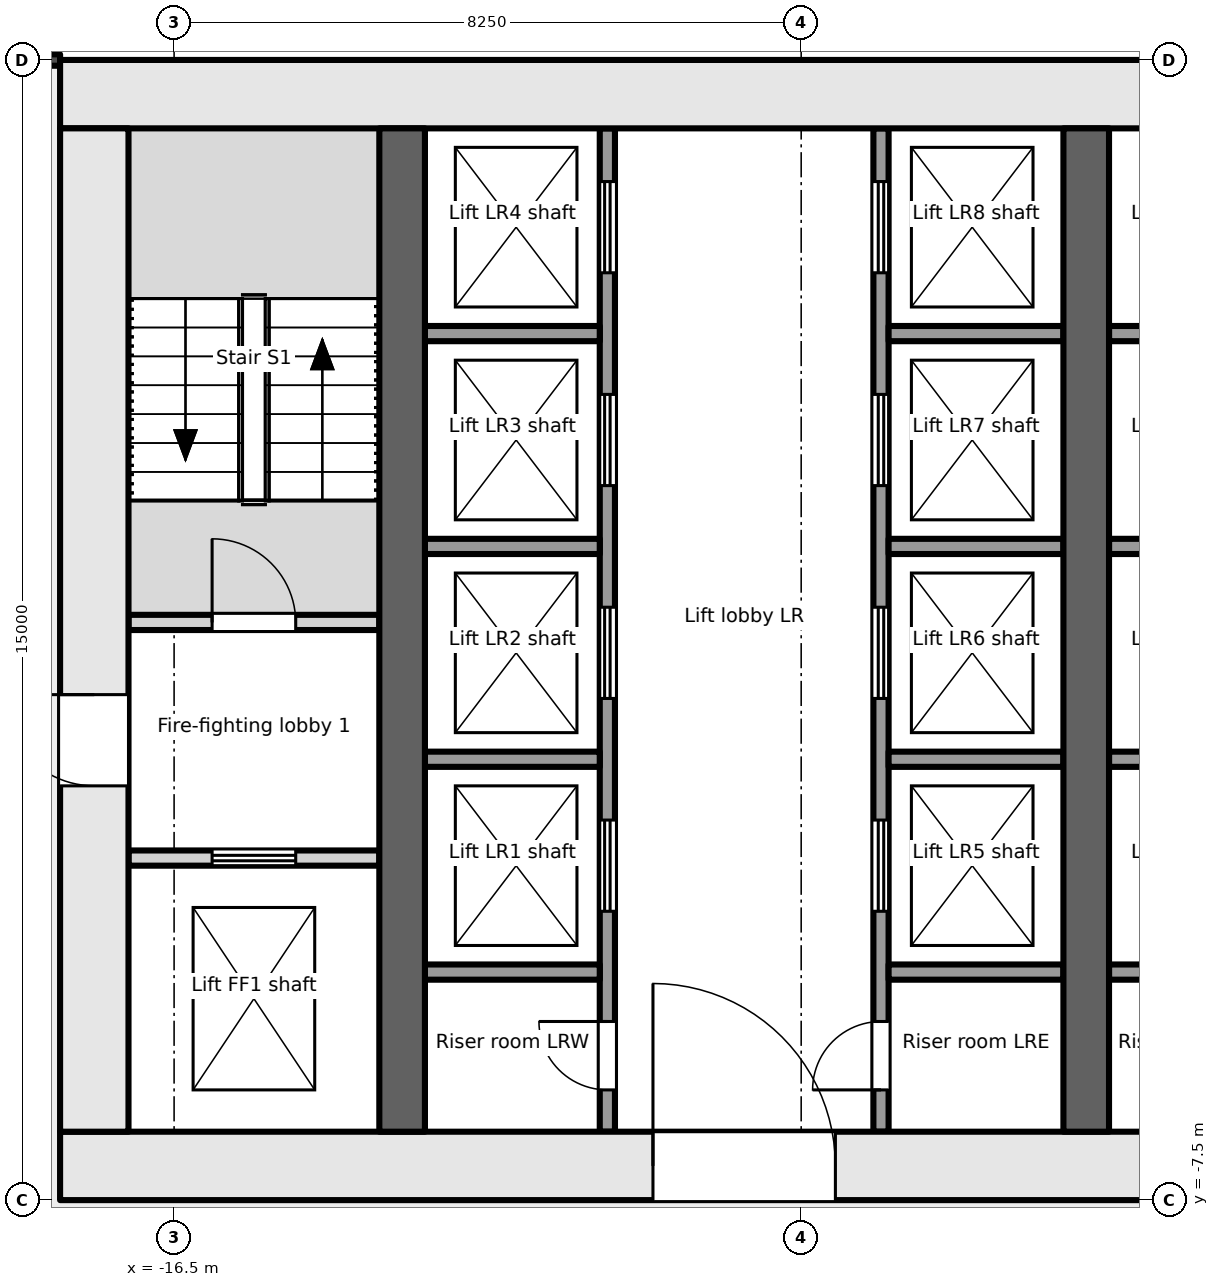
"""IFC4 building model, lengths in metres.
Left out: names, types, materials, properties, quantities, classifications, styles, units other than length and angle.
Written with IfcOpenShell. Run it as: python <this file> out.ifc"""

import sys

from ifc_helpers import new_model, si_unit, direction, frame, frame_2d, origin, place, context, subcontext, project, spatial, rectangle, extrude, element, fill, save


model = new_model("IFC4")
c1 = context("Model", 3, precision=1e-05, world=origin(), true_north=direction((0.0, 1.0)))
c2 = subcontext(c1, "Body", "Model", "MODEL_VIEW")
j1 = project(units=[si_unit("LENGTHUNIT", "METRE"), si_unit("PLANEANGLEUNIT", "RADIAN")], contexts=[c1])
p1 = place(None, origin())
s1 = spatial("IfcSite", under=j1, at=p1, CompositionType="ELEMENT")
p2 = place(p1, origin())
s2 = spatial("IfcBuilding", under=s1, at=p2, CompositionType="ELEMENT")
p3 = place(p2, frame((0.0, 0.0, 7.2)))
s3 = spatial("IfcBuildingStorey", under=s2, at=p3, CompositionType="ELEMENT", Elevation=7.2)
p4 = place(p3, frame((-18.0, -7.05, -0.2), z_axis=(0.0, 0.0, 1.0), x_axis=(1.0, 0.0, 0.0)))
e1 = element("IfcWall", 1, at=p4, inside=s3, PredefinedType="SHEAR", context=c2, shape_type="SweptSolid", body=[
    extrude(rectangle(XDim=36.0, YDim=0.9, at=frame_2d((18.0, 0.0))), origin(), (0.0, 0.0, 1.0), 5.4),
])
p5 = place(p4, frame((7.8, 0.0, 0.2)))
e2 = element("IfcOpeningElement", 2, at=p5, cuts=e1, PredefinedType="OPENING", context=c2, shape_type="SweptSolid", body=[
    extrude(rectangle(XDim=2.4, YDim=2.1, at=frame_2d((1.2, 1.05))), frame((0.0, 0.46, 0.0), z_axis=(0.0, -1.0, 0.0), x_axis=(1.0, 0.0, 0.0)), (0.0, 0.0, 1.0), 0.921),
])
p6 = place(p4, frame((17.4, 0.0, 0.2)))
e3 = element("IfcOpeningElement", 3, at=p6, cuts=e1, PredefinedType="OPENING", context=c2, shape_type="SweptSolid", body=[
    extrude(rectangle(XDim=1.2, YDim=2.1, at=frame_2d((0.6, 1.05))), frame((0.0, 0.46, 0.0), z_axis=(0.0, -1.0, 0.0), x_axis=(1.0, 0.0, 0.0)), (0.0, 0.0, 1.0), 0.921),
])
p7 = place(p4, frame((26.1, 0.0, 0.2)))
e4 = element("IfcOpeningElement", 4, at=p7, cuts=e1, PredefinedType="OPENING", context=c2, shape_type="SweptSolid", body=[
    extrude(rectangle(XDim=2.4, YDim=2.1, at=frame_2d((1.2, 1.05))), frame((0.0, 0.46, 0.0), z_axis=(0.0, -1.0, 0.0), x_axis=(1.0, 0.0, 0.0)), (0.0, 0.0, 1.0), 0.921),
])
p8 = place(p3, frame((-18.0, 7.05, -0.2), z_axis=(0.0, 0.0, 1.0), x_axis=(1.0, 0.0, 0.0)))
e5 = element("IfcWall", 5, at=p8, inside=s3, PredefinedType="SHEAR", context=c2, shape_type="SweptSolid", body=[
    extrude(rectangle(XDim=36.0, YDim=0.9, at=frame_2d((18.0, 0.0))), origin(), (0.0, 0.0, 1.0), 5.4),
])
p9 = place(p3, frame((-17.55, -6.6, -0.2), z_axis=(0.0, 0.0, 1.0), x_axis=(0.0, 1.0, 0.0)))
e6 = element("IfcWall", 6, at=p9, inside=s3, PredefinedType="SHEAR", context=c2, shape_type="SweptSolid", body=[
    extrude(rectangle(XDim=13.2, YDim=0.9, at=frame_2d((6.6, 0.0))), origin(), (0.0, 0.0, 1.0), 5.4),
])
p10 = place(p9, frame((4.55, 0.0, 0.2)))
e7 = element("IfcOpeningElement", 7, at=p10, cuts=e6, PredefinedType="OPENING", context=c2, shape_type="SweptSolid", body=[
    extrude(rectangle(XDim=1.2, YDim=2.1, at=frame_2d((0.6, 1.05))), frame((0.0, 0.46, 0.0), z_axis=(0.0, -1.0, 0.0), x_axis=(1.0, 0.0, 0.0)), (0.0, 0.0, 1.0), 0.921),
])
for number, where, z_axis, x_axis in (
    (8, (-13.5, -6.6, -0.2), (0.0, 0.0, 1.0), (0.0, 1.0, 0.0)),
    (9, (-4.5, -6.6, -0.2), (0.0, 0.0, 1.0), (0.0, 1.0, 0.0)),
):
    element("IfcWall", number, at=place(p3, frame(where, z_axis=z_axis, x_axis=x_axis)), inside=s3, PredefinedType="SHEAR", context=c2, shape_type="SweptSolid", body=[
        extrude(rectangle(XDim=13.2, YDim=0.6, at=frame_2d((6.6, 0.0))), origin(), (0.0, 0.0, 1.0), 5.4),
    ])
p11 = place(p3, frame((-17.1, -3.0, 0.0), z_axis=(0.0, 0.0, 1.0), x_axis=(1.0, 0.0, 0.0)))
e10 = element("IfcWall", 10, at=p11, inside=s3, PredefinedType="PARTITIONING", context=c2, shape_type="SweptSolid", body=[
    extrude(rectangle(XDim=3.3, YDim=0.2, at=frame_2d((1.65, 0.0))), origin(), (0.0, 0.0, 1.0), 5.2),
])
p12 = place(p11, frame((1.1, 0.0, 0.0)))
e11 = element("IfcOpeningElement", 11, at=p12, cuts=e10, PredefinedType="OPENING", context=c2, shape_type="SweptSolid", body=[
    extrude(rectangle(XDim=1.1, YDim=2.1, at=frame_2d((0.55, 1.05))), frame((0.0, 0.111, 0.0), z_axis=(0.0, -1.0, 0.0), x_axis=(1.0, 0.0, 0.0)), (0.0, 0.0, 1.0), 0.221),
])
p13 = place(p3, frame((-17.1, 0.1, 0.0), z_axis=(0.0, 0.0, 1.0), x_axis=(1.0, 0.0, 0.0)))
e12 = element("IfcWall", 12, at=p13, inside=s3, PredefinedType="PARTITIONING", context=c2, shape_type="SweptSolid", body=[
    extrude(rectangle(XDim=3.3, YDim=0.2, at=frame_2d((1.65, 0.0))), origin(), (0.0, 0.0, 1.0), 5.2),
])
p14 = place(p13, frame((1.1, 0.0, 0.0)))
e13 = element("IfcOpeningElement", 13, at=p14, cuts=e12, PredefinedType="OPENING", context=c2, shape_type="SweptSolid", body=[
    extrude(rectangle(XDim=1.1, YDim=2.1, at=frame_2d((0.55, 1.05))), frame((0.0, 0.111, 0.0), z_axis=(0.0, -1.0, 0.0), x_axis=(1.0, 0.0, 0.0)), (0.0, 0.0, 1.0), 0.221),
])
p15 = place(p3, frame((-10.8, -6.6, 0.0), z_axis=(0.0, 0.0, 1.0), x_axis=(0.0, 1.0, 0.0)))
e14 = element("IfcWall", 14, at=p15, inside=s3, PredefinedType="PARTITIONING", context=c2, shape_type="SweptSolid", body=[
    extrude(rectangle(XDim=13.2, YDim=0.2, at=frame_2d((6.6, 0.0))), origin(), (0.0, 0.0, 1.0), 5.2),
])
p16 = place(p15, frame((0.55, 0.0, 0.0)))
e15 = element("IfcOpeningElement", 15, at=p16, cuts=e14, PredefinedType="OPENING", context=c2, shape_type="SweptSolid", body=[
    extrude(rectangle(XDim=0.9, YDim=2.1, at=frame_2d((0.45, 1.05))), frame((0.0, 0.111, 0.0), z_axis=(0.0, -1.0, 0.0), x_axis=(1.0, 0.0, 0.0)), (0.0, 0.0, 1.0), 0.221),
])
p17 = place(p15, frame((2.9, 0.0, 0.0)))
e16 = element("IfcOpeningElement", 16, at=p17, cuts=e14, PredefinedType="OPENING", context=c2, shape_type="SweptSolid", body=[
    extrude(rectangle(XDim=1.2, YDim=2.1, at=frame_2d((0.6, 1.05))), frame((0.0, 0.111, 0.0), z_axis=(0.0, -1.0, 0.0), x_axis=(1.0, 0.0, 0.0)), (0.0, 0.0, 1.0), 0.221),
])
p18 = place(p15, frame((5.7, 0.0, 0.0)))
e17 = element("IfcOpeningElement", 17, at=p18, cuts=e14, PredefinedType="OPENING", context=c2, shape_type="SweptSolid", body=[
    extrude(rectangle(XDim=1.2, YDim=2.1, at=frame_2d((0.6, 1.05))), frame((0.0, 0.111, 0.0), z_axis=(0.0, -1.0, 0.0), x_axis=(1.0, 0.0, 0.0)), (0.0, 0.0, 1.0), 0.221),
])
p19 = place(p15, frame((8.5, 0.0, 0.0)))
e18 = element("IfcOpeningElement", 18, at=p19, cuts=e14, PredefinedType="OPENING", context=c2, shape_type="SweptSolid", body=[
    extrude(rectangle(XDim=1.2, YDim=2.1, at=frame_2d((0.6, 1.05))), frame((0.0, 0.111, 0.0), z_axis=(0.0, -1.0, 0.0), x_axis=(1.0, 0.0, 0.0)), (0.0, 0.0, 1.0), 0.221),
])
p20 = place(p15, frame((11.3, 0.0, 0.0)))
e19 = element("IfcOpeningElement", 19, at=p20, cuts=e14, PredefinedType="OPENING", context=c2, shape_type="SweptSolid", body=[
    extrude(rectangle(XDim=1.2, YDim=2.1, at=frame_2d((0.6, 1.05))), frame((0.0, 0.111, 0.0), z_axis=(0.0, -1.0, 0.0), x_axis=(1.0, 0.0, 0.0)), (0.0, 0.0, 1.0), 0.221),
])
p21 = place(p3, frame((-7.2, -6.6, 0.0), z_axis=(0.0, 0.0, 1.0), x_axis=(0.0, 1.0, 0.0)))
e20 = element("IfcWall", 20, at=p21, inside=s3, PredefinedType="PARTITIONING", context=c2, shape_type="SweptSolid", body=[
    extrude(rectangle(XDim=13.2, YDim=0.2, at=frame_2d((6.6, 0.0))), origin(), (0.0, 0.0, 1.0), 5.2),
])
p22 = place(p21, frame((0.55, 0.0, 0.0)))
e21 = element("IfcOpeningElement", 21, at=p22, cuts=e20, PredefinedType="OPENING", context=c2, shape_type="SweptSolid", body=[
    extrude(rectangle(XDim=0.9, YDim=2.1, at=frame_2d((0.45, 1.05))), frame((0.0, 0.111, 0.0), z_axis=(0.0, -1.0, 0.0), x_axis=(1.0, 0.0, 0.0)), (0.0, 0.0, 1.0), 0.221),
])
p23 = place(p21, frame((2.9, 0.0, 0.0)))
e22 = element("IfcOpeningElement", 22, at=p23, cuts=e20, PredefinedType="OPENING", context=c2, shape_type="SweptSolid", body=[
    extrude(rectangle(XDim=1.2, YDim=2.1, at=frame_2d((0.6, 1.05))), frame((0.0, 0.111, 0.0), z_axis=(0.0, -1.0, 0.0), x_axis=(1.0, 0.0, 0.0)), (0.0, 0.0, 1.0), 0.221),
])
p24 = place(p21, frame((5.7, 0.0, 0.0)))
e23 = element("IfcOpeningElement", 23, at=p24, cuts=e20, PredefinedType="OPENING", context=c2, shape_type="SweptSolid", body=[
    extrude(rectangle(XDim=1.2, YDim=2.1, at=frame_2d((0.6, 1.05))), frame((0.0, 0.111, 0.0), z_axis=(0.0, -1.0, 0.0), x_axis=(1.0, 0.0, 0.0)), (0.0, 0.0, 1.0), 0.221),
])
p25 = place(p21, frame((8.5, 0.0, 0.0)))
e24 = element("IfcOpeningElement", 24, at=p25, cuts=e20, PredefinedType="OPENING", context=c2, shape_type="SweptSolid", body=[
    extrude(rectangle(XDim=1.2, YDim=2.1, at=frame_2d((0.6, 1.05))), frame((0.0, 0.111, 0.0), z_axis=(0.0, -1.0, 0.0), x_axis=(1.0, 0.0, 0.0)), (0.0, 0.0, 1.0), 0.221),
])
p26 = place(p21, frame((11.3, 0.0, 0.0)))
e25 = element("IfcOpeningElement", 25, at=p26, cuts=e20, PredefinedType="OPENING", context=c2, shape_type="SweptSolid", body=[
    extrude(rectangle(XDim=1.2, YDim=2.1, at=frame_2d((0.6, 1.05))), frame((0.0, 0.111, 0.0), z_axis=(0.0, -1.0, 0.0), x_axis=(1.0, 0.0, 0.0)), (0.0, 0.0, 1.0), 0.221),
])
for number, where, z_axis, x_axis in (
    (26, (-13.2, -1.7, 0.0), (0.0, 0.0, 1.0), (1.0, 0.0, 0.0)),
    (27, (-13.2, 1.1, 0.0), (0.0, 0.0, 1.0), (1.0, 0.0, 0.0)),
    (28, (-13.2, 3.9, 0.0), (0.0, 0.0, 1.0), (1.0, 0.0, 0.0)),
    (29, (-13.2, -4.5, 0.0), (0.0, 0.0, 1.0), (1.0, 0.0, 0.0)),
    (30, (-7.1, -1.7, 0.0), (0.0, 0.0, 1.0), (1.0, 0.0, 0.0)),
    (31, (-7.1, 1.1, 0.0), (0.0, 0.0, 1.0), (1.0, 0.0, 0.0)),
    (32, (-7.1, 3.9, 0.0), (0.0, 0.0, 1.0), (1.0, 0.0, 0.0)),
    (33, (-7.1, -4.5, 0.0), (0.0, 0.0, 1.0), (1.0, 0.0, 0.0)),
    (34, (-4.2, -1.7, 0.0), (0.0, 0.0, 1.0), (1.0, 0.0, 0.0)),
    (35, (-4.2, 1.1, 0.0), (0.0, 0.0, 1.0), (1.0, 0.0, 0.0)),
    (36, (-4.2, 3.9, 0.0), (0.0, 0.0, 1.0), (1.0, 0.0, 0.0)),
    (37, (-4.2, -4.5, 0.0), (0.0, 0.0, 1.0), (1.0, 0.0, 0.0)),
):
    element("IfcWall", number, at=place(p3, frame(where, z_axis=z_axis, x_axis=x_axis)), inside=s3, PredefinedType="PARTITIONING", context=c2, shape_type="SweptSolid", body=[
        extrude(rectangle(XDim=2.3, YDim=0.2, at=frame_2d((1.15, 0.0))), origin(), (0.0, 0.0, 1.0), 5.2),
    ])
p27 = place(p3, frame((-20.91, 7.499, 0.0), z_axis=(0.0, 0.0, 1.0), x_axis=(1.0, 0.0, 0.0)))
e38 = element("IfcWall", 38, at=p27, inside=s3, PredefinedType="PARTITIONING", context=c2, shape_type="SweptSolid", body=[
    extrude(rectangle(XDim=2.91, YDim=0.15, at=frame_2d((1.455, 0.0))), origin(), (0.0, 0.0, 1.0), 4.9),
])
p28 = place(p27, frame((0.705, 0.0, 0.0)))
e39 = element("IfcOpeningElement", 39, at=p28, cuts=e38, PredefinedType="OPENING", context=c2, shape_type="SweptSolid", body=[
    extrude(rectangle(XDim=1.5, YDim=2.1, at=frame_2d((0.75, 1.05))), frame((0.0, 0.085, 0.0), z_axis=(0.0, -1.0, 0.0), x_axis=(1.0, 0.0, 0.0)), (0.0, 0.0, 1.0), 0.171),
])
p29 = place(p12, origin())
e40 = element("IfcDoor", 40, at=p29, inside=s3, OperationType="DOUBLE_DOOR_SLIDING", PredefinedType="DOOR", context=c2, shape_type="SweptSolid", body=[
    extrude(rectangle(XDim=1.1, YDim=2.1, at=frame_2d((0.55, 1.05))), frame((0.0, 0.025, 0.0), z_axis=(0.0, -1.0, 0.0), x_axis=(1.0, 0.0, 0.0)), (0.0, 0.0, 1.0), 0.05),
])
fill(e11, e40)
p30 = place(p10, origin())
e41 = element("IfcDoor", 41, at=p30, inside=s3, OperationType="SINGLE_SWING_RIGHT", PredefinedType="DOOR", context=c2, shape_type="SweptSolid", body=[
    extrude(rectangle(XDim=1.2, YDim=2.1, at=frame_2d((0.6, 1.05))), frame((0.0, 0.025, 0.0), z_axis=(0.0, -1.0, 0.0), x_axis=(1.0, 0.0, 0.0)), (0.0, 0.0, 1.0), 0.05),
])
fill(e7, e41)
p31 = place(p14, origin())
e42 = element("IfcDoor", 42, at=p31, inside=s3, OperationType="SINGLE_SWING_LEFT", PredefinedType="DOOR", context=c2, shape_type="SweptSolid", body=[
    extrude(rectangle(XDim=1.1, YDim=2.1, at=frame_2d((0.55, 1.05))), frame((0.0, 0.025, 0.0), z_axis=(0.0, -1.0, 0.0), x_axis=(1.0, 0.0, 0.0)), (0.0, 0.0, 1.0), 0.05),
])
fill(e13, e42)
p32 = place(p16, origin())
e43 = element("IfcDoor", 43, at=p32, inside=s3, OperationType="SINGLE_SWING_RIGHT", PredefinedType="DOOR", context=c2, shape_type="SweptSolid", body=[
    extrude(rectangle(XDim=0.9, YDim=2.1, at=frame_2d((0.45, 1.05))), frame((0.0, 0.025, 0.0), z_axis=(0.0, -1.0, 0.0), x_axis=(1.0, 0.0, 0.0)), (0.0, 0.0, 1.0), 0.05),
])
fill(e15, e43)
p33 = place(p17, origin())
e44 = element("IfcDoor", 44, at=p33, inside=s3, OperationType="DOUBLE_DOOR_SLIDING", PredefinedType="DOOR", context=c2, shape_type="SweptSolid", body=[
    extrude(rectangle(XDim=1.2, YDim=2.1, at=frame_2d((0.6, 1.05))), frame((0.0, 0.025, 0.0), z_axis=(0.0, -1.0, 0.0), x_axis=(1.0, 0.0, 0.0)), (0.0, 0.0, 1.0), 0.05),
])
fill(e16, e44)
p34 = place(p18, origin())
e45 = element("IfcDoor", 45, at=p34, inside=s3, OperationType="DOUBLE_DOOR_SLIDING", PredefinedType="DOOR", context=c2, shape_type="SweptSolid", body=[
    extrude(rectangle(XDim=1.2, YDim=2.1, at=frame_2d((0.6, 1.05))), frame((0.0, 0.025, 0.0), z_axis=(0.0, -1.0, 0.0), x_axis=(1.0, 0.0, 0.0)), (0.0, 0.0, 1.0), 0.05),
])
fill(e17, e45)
p35 = place(p19, origin())
e46 = element("IfcDoor", 46, at=p35, inside=s3, OperationType="DOUBLE_DOOR_SLIDING", PredefinedType="DOOR", context=c2, shape_type="SweptSolid", body=[
    extrude(rectangle(XDim=1.2, YDim=2.1, at=frame_2d((0.6, 1.05))), frame((0.0, 0.025, 0.0), z_axis=(0.0, -1.0, 0.0), x_axis=(1.0, 0.0, 0.0)), (0.0, 0.0, 1.0), 0.05),
])
fill(e18, e46)
p36 = place(p20, origin())
e47 = element("IfcDoor", 47, at=p36, inside=s3, OperationType="DOUBLE_DOOR_SLIDING", PredefinedType="DOOR", context=c2, shape_type="SweptSolid", body=[
    extrude(rectangle(XDim=1.2, YDim=2.1, at=frame_2d((0.6, 1.05))), frame((0.0, 0.025, 0.0), z_axis=(0.0, -1.0, 0.0), x_axis=(1.0, 0.0, 0.0)), (0.0, 0.0, 1.0), 0.05),
])
fill(e19, e47)
p37 = place(p22, origin())
e48 = element("IfcDoor", 48, at=p37, inside=s3, OperationType="SINGLE_SWING_LEFT", PredefinedType="DOOR", context=c2, shape_type="SweptSolid", body=[
    extrude(rectangle(XDim=0.9, YDim=2.1, at=frame_2d((0.45, 1.05))), frame((0.0, 0.025, 0.0), z_axis=(0.0, -1.0, 0.0), x_axis=(1.0, 0.0, 0.0)), (0.0, 0.0, 1.0), 0.05),
])
fill(e21, e48)
p38 = place(p23, origin())
e49 = element("IfcDoor", 49, at=p38, inside=s3, OperationType="DOUBLE_DOOR_SLIDING", PredefinedType="DOOR", context=c2, shape_type="SweptSolid", body=[
    extrude(rectangle(XDim=1.2, YDim=2.1, at=frame_2d((0.6, 1.05))), frame((0.0, 0.025, 0.0), z_axis=(0.0, -1.0, 0.0), x_axis=(1.0, 0.0, 0.0)), (0.0, 0.0, 1.0), 0.05),
])
fill(e22, e49)
p39 = place(p24, origin())
e50 = element("IfcDoor", 50, at=p39, inside=s3, OperationType="DOUBLE_DOOR_SLIDING", PredefinedType="DOOR", context=c2, shape_type="SweptSolid", body=[
    extrude(rectangle(XDim=1.2, YDim=2.1, at=frame_2d((0.6, 1.05))), frame((0.0, 0.025, 0.0), z_axis=(0.0, -1.0, 0.0), x_axis=(1.0, 0.0, 0.0)), (0.0, 0.0, 1.0), 0.05),
])
fill(e23, e50)
p40 = place(p25, origin())
e51 = element("IfcDoor", 51, at=p40, inside=s3, OperationType="DOUBLE_DOOR_SLIDING", PredefinedType="DOOR", context=c2, shape_type="SweptSolid", body=[
    extrude(rectangle(XDim=1.2, YDim=2.1, at=frame_2d((0.6, 1.05))), frame((0.0, 0.025, 0.0), z_axis=(0.0, -1.0, 0.0), x_axis=(1.0, 0.0, 0.0)), (0.0, 0.0, 1.0), 0.05),
])
fill(e24, e51)
p41 = place(p26, origin())
e52 = element("IfcDoor", 52, at=p41, inside=s3, OperationType="DOUBLE_DOOR_SLIDING", PredefinedType="DOOR", context=c2, shape_type="SweptSolid", body=[
    extrude(rectangle(XDim=1.2, YDim=2.1, at=frame_2d((0.6, 1.05))), frame((0.0, 0.025, 0.0), z_axis=(0.0, -1.0, 0.0), x_axis=(1.0, 0.0, 0.0)), (0.0, 0.0, 1.0), 0.05),
])
fill(e25, e52)
p42 = place(p5, origin())
e53 = element("IfcDoor", 53, at=p42, inside=s3, OperationType="DOUBLE_DOOR_DOUBLE_SWING", PredefinedType="DOOR", context=c2, shape_type="SweptSolid", body=[
    extrude(rectangle(XDim=2.4, YDim=2.1, at=frame_2d((1.2, 1.05))), frame((0.0, 0.025, 0.0), z_axis=(0.0, -1.0, 0.0), x_axis=(1.0, 0.0, 0.0)), (0.0, 0.0, 1.0), 0.05),
])
fill(e2, e53)
save(model, sys.argv[1])
